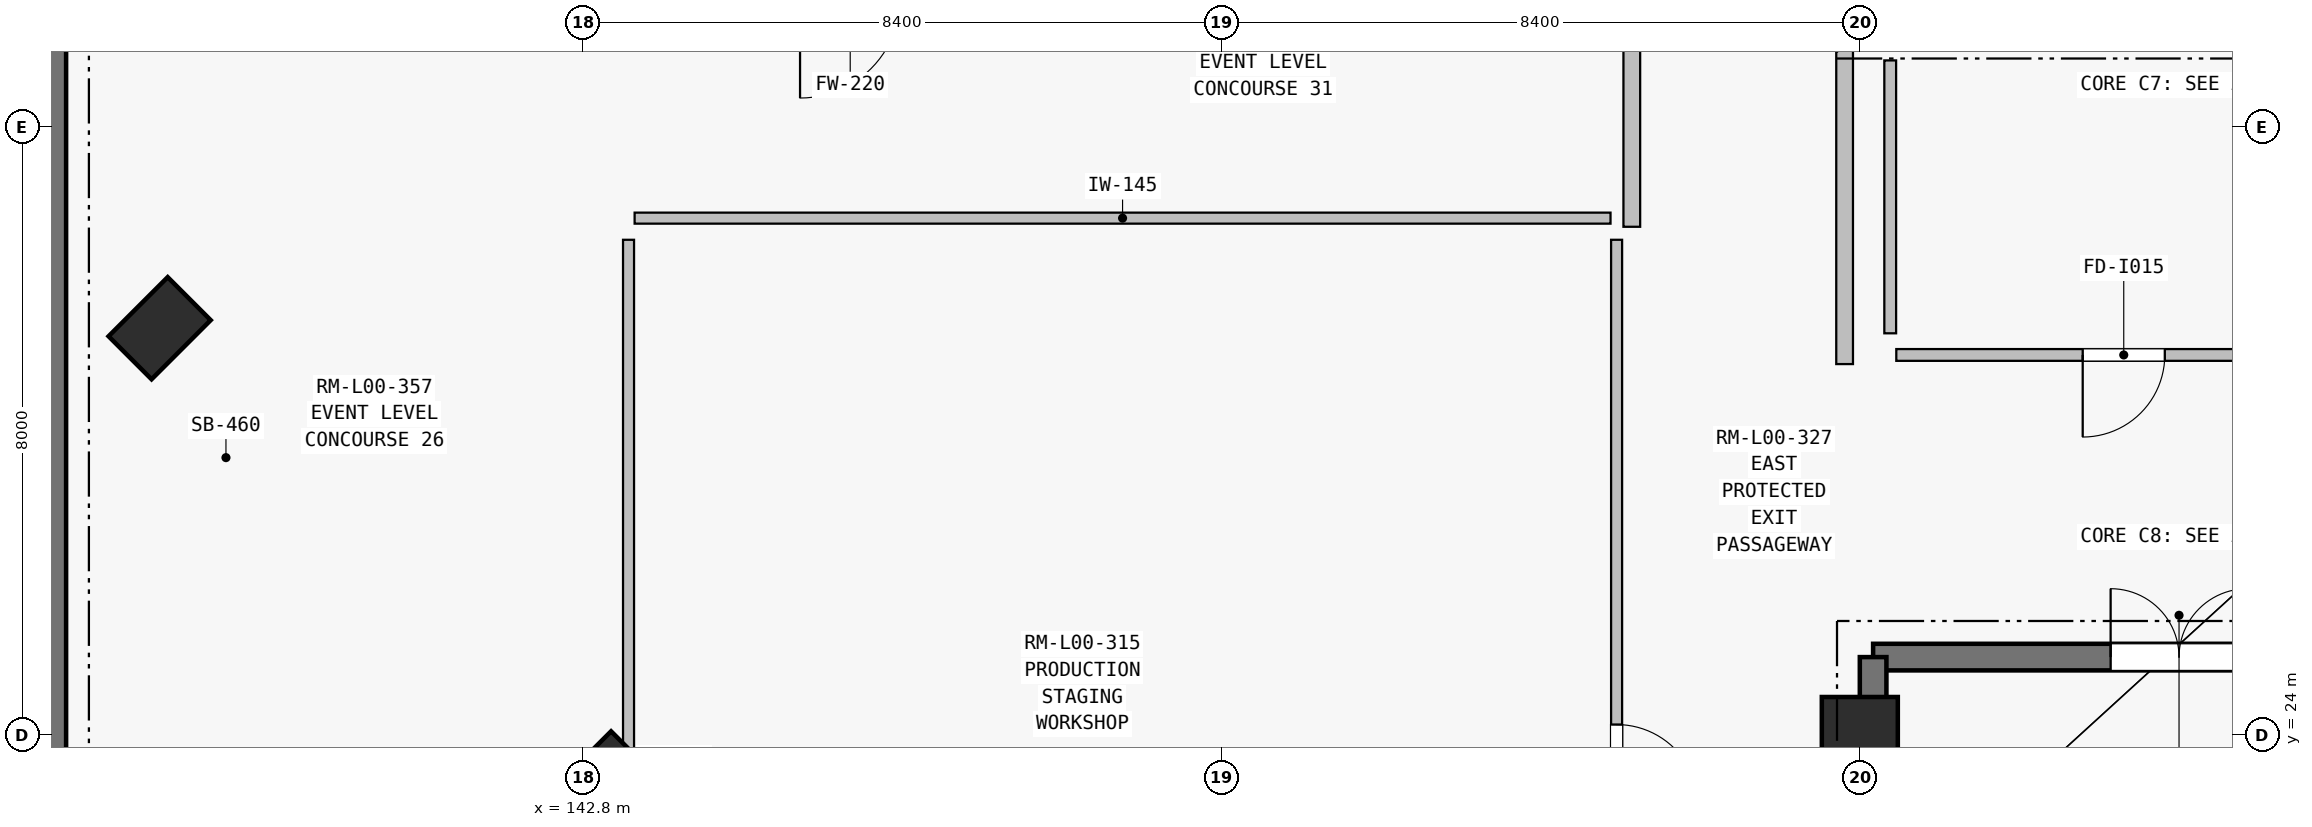
"""IFC4 building model, lengths in metres.
Left out: names, types, materials, properties, quantities, classifications, styles, units other than length and angle.
Written with IfcOpenShell. Run it as: python <this file> out.ifc"""

import sys

from ifc_helpers import new_model, si_unit, direction, frame, frame_2d, origin, origin_2d, place, context, subcontext, project, spatial, rectangle, i_section, extrude, element, fill, save


model = new_model("IFC4")
c1 = context("Model", 3, precision=1e-05, world=origin(), true_north=direction((0.0, 1.0)))
c2 = subcontext(c1, "Body", "Model", "MODEL_VIEW")
j1 = project(units=[si_unit("LENGTHUNIT", "METRE"), si_unit("PLANEANGLEUNIT", "RADIAN")], contexts=[c1])
p1 = place(None, origin())
s1 = spatial("IfcSite", under=j1, at=p1, CompositionType="ELEMENT")
p2 = place(p1, origin())
s2 = spatial("IfcBuilding", under=s1, at=p2, CompositionType="ELEMENT")
p3 = place(p2, origin())
s3 = spatial("IfcBuildingStorey", under=s2, at=p3, CompositionType="ELEMENT", Elevation=0.0)
p4 = place(p3, frame((137.231, 29.352, 0.0), z_axis=(0.0, 0.0, 1.0), x_axis=(0.707106781187, -0.707106781187, 0.0)))
e1 = element("IfcColumn", 1, at=p4, inside=s3, PredefinedType="COLUMN", context=c2, shape_type="SweptSolid", body=[
    extrude(rectangle(XDim=0.8, YDim=1.1, at=origin_2d()), origin(), (0.0, 0.0, 1.0), 5.4),
])
p5 = place(p3, frame((143.17, 23.695, 0.0), z_axis=(0.0, 0.0, 1.0), x_axis=(0.707106781187, -0.707106781187, 0.0)))
e2 = element("IfcColumn", 2, at=p5, inside=s3, PredefinedType="COLUMN", context=c2, shape_type="SweptSolid", body=[
    extrude(i_section(OverallWidth=0.5, OverallDepth=0.5, WebThickness=0.02, FlangeThickness=0.035, at=origin_2d()), origin(), (0.0, 0.0, 1.0), 5.4),
])
p6 = place(p3, frame((159.6, 24.0, 0.0), z_axis=(0.0, 0.0, 1.0), x_axis=(1.0, 0.0, 0.0)))
e3 = element("IfcColumn", 3, at=p6, inside=s3, PredefinedType="COLUMN", context=c2, shape_type="SweptSolid", body=[
    extrude(rectangle(XDim=1.0, YDim=1.0, at=origin_2d()), origin(), (0.0, 0.0, 1.0), 5.4),
])
p7 = place(p3, frame((135.825, 18.775, 0.0), z_axis=(0.0, 0.0, 1.0), x_axis=(0.0, 1.0, 0.0)))
e4 = element("IfcWall", 4, at=p7, inside=s3, PredefinedType="SHEAR", context=c2, shape_type="SweptSolid", body=[
    extrude(rectangle(XDim=14.85, YDim=0.35, at=frame_2d((7.425, 0.0))), origin(), (0.0, 0.0, 1.0), 5.4),
])
p8 = place(p7, frame((2.855, 0.0, 0.0)))
e5 = element("IfcOpeningElement", 5, at=p8, cuts=e4, PredefinedType="OPENING", context=c2, shape_type="SweptSolid", body=[
    extrude(rectangle(XDim=0.9, YDim=2.1, at=frame_2d((0.45, 1.05))), frame((0.0, 0.185, 0.0), z_axis=(0.0, -1.0, 0.0), x_axis=(1.0, 0.0, 0.0)), (0.0, 0.0, 1.0), 0.37),
])
p9 = place(p3, frame((159.775, 25.025, 0.0), z_axis=(0.0, 0.0, 1.0), x_axis=(1.0, 0.0, 0.0)))
e6 = element("IfcWall", 6, at=p9, inside=s3, PredefinedType="SHEAR", context=c2, shape_type="SweptSolid", body=[
    extrude(rectangle(XDim=8.05, YDim=0.35, at=frame_2d((4.025, 0.0))), origin(), (0.0, 0.0, 1.0), 5.4),
])
p10 = place(p9, frame((3.125, 0.0, 0.0)))
e7 = element("IfcOpeningElement", 7, at=p10, cuts=e6, PredefinedType="OPENING", context=c2, shape_type="SweptSolid", body=[
    extrude(rectangle(XDim=1.8, YDim=2.25, at=frame_2d((0.9, 1.125))), frame((0.0, 0.185, 0.0), z_axis=(0.0, -1.0, 0.0), x_axis=(1.0, 0.0, 0.0)), (0.0, 0.0, 1.0), 0.37),
])
p11 = place(p3, frame((159.775, 10.175, 0.0), z_axis=(0.0, 0.0, 1.0), x_axis=(0.0, 1.0, 0.0)))
e8 = element("IfcWall", 8, at=p11, inside=s3, PredefinedType="SHEAR", context=c2, shape_type="SweptSolid", body=[
    extrude(rectangle(XDim=14.85, YDim=0.35, at=frame_2d((7.425, 0.0))), origin(), (0.0, 0.0, 1.0), 5.4),
])
p12 = place(p3, frame((166.065, 29.0, 0.0), z_axis=(0.0, 0.0, 1.0), x_axis=(-1.0, 0.0, 0.0)))
e9 = element("IfcWall", 9, at=p12, inside=s3, PredefinedType="PARTITIONING", context=c2, shape_type="SweptSolid", body=[
    extrude(rectangle(XDim=5.985, YDim=0.155, at=frame_2d((2.993, 0.0))), origin(), (0.0, 0.0, 1.0), 5.12),
])
p13 = place(p12, frame((2.453, 0.0, 0.0)))
e10 = element("IfcOpeningElement", 10, at=p13, cuts=e9, PredefinedType="OPENING", context=c2, shape_type="SweptSolid", body=[
    extrude(rectangle(XDim=1.08, YDim=2.15, at=frame_2d((0.54, 1.075))), frame((0.0, 0.087, 0.0), z_axis=(0.0, -1.0, 0.0), x_axis=(1.0, 0.0, 0.0)), (0.0, 0.0, 1.0), 0.175),
])
p14 = place(p3, frame((160.0, 29.285, 0.0), z_axis=(0.0, 0.0, 1.0), x_axis=(0.0, 1.0, 0.0)))
e11 = element("IfcWall", 11, at=p14, inside=s3, PredefinedType="PARTITIONING", context=c2, shape_type="SweptSolid", body=[
    extrude(rectangle(XDim=3.59, YDim=0.155, at=frame_2d((1.795, 0.0))), origin(), (0.0, 0.0, 1.0), 5.12),
])
p15 = place(p3, frame((143.48, 30.8, 0.0), z_axis=(0.0, 0.0, 1.0), x_axis=(1.0, 0.0, 0.0)))
e12 = element("IfcWall", 12, at=p15, inside=s3, PredefinedType="PARTITIONING", context=c2, shape_type="SweptSolid", body=[
    extrude(rectangle(XDim=12.84, YDim=0.145, at=frame_2d((6.42, 0.0))), origin(), (0.0, 0.0, 1.0), 4.295),
])
p16 = place(p3, frame((156.4, 30.515, 0.0), z_axis=(0.0, 0.0, 1.0), x_axis=(0.0, -1.0, 0.0)))
e13 = element("IfcWall", 13, at=p16, inside=s3, PredefinedType="PARTITIONING", context=c2, shape_type="SweptSolid", body=[
    extrude(rectangle(XDim=13.835, YDim=0.145, at=frame_2d((6.917, 0.0))), origin(), (0.0, 0.0, 1.0), 5.18),
])
p17 = place(p16, frame((6.378, 0.0, 0.0)))
e14 = element("IfcOpeningElement", 14, at=p17, cuts=e13, PredefinedType="OPENING", context=c2, shape_type="SweptSolid", body=[
    extrude(rectangle(XDim=1.08, YDim=2.15, at=frame_2d((0.54, 1.075))), frame((0.0, 0.083, 0.0), z_axis=(0.0, -1.0, 0.0), x_axis=(1.0, 0.0, 0.0)), (0.0, 0.0, 1.0), 0.165),
])
p18 = place(p3, frame((143.4, 16.885, 0.0), z_axis=(0.0, 0.0, 1.0), x_axis=(0.0, 1.0, 0.0)))
e15 = element("IfcWall", 15, at=p18, inside=s3, PredefinedType="PARTITIONING", context=c2, shape_type="SweptSolid", body=[
    extrude(rectangle(XDim=13.63, YDim=0.145, at=frame_2d((6.815, 0.0))), origin(), (0.0, 0.0, 1.0), 4.295),
])
p19 = place(p3, frame((156.6, 30.686, 0.0), z_axis=(0.0, 0.0, 1.0), x_axis=(0.0, 1.0, 0.0)))
e16 = element("IfcWall", 16, at=p19, inside=s3, PredefinedType="SOLIDWALL", context=c2, shape_type="SweptSolid", body=[
    extrude(rectangle(XDim=2.934, YDim=0.22, at=frame_2d((1.467, 0.0))), origin(), (0.0, 0.0, 1.0), 5.12),
])
p20 = place(p3, frame((159.4, 33.107, 0.0), z_axis=(0.0, 0.0, 1.0), x_axis=(0.0, -1.0, 0.0)))
e17 = element("IfcWall", 17, at=p20, inside=s3, PredefinedType="SOLIDWALL", context=c2, shape_type="SweptSolid", body=[
    extrude(rectangle(XDim=4.227, YDim=0.22, at=frame_2d((2.113, 0.0))), origin(), (0.0, 0.0, 1.0), 5.12),
])
p21 = place(p10, origin())
e18 = element("IfcDoor", 18, at=p21, inside=s3, OperationType="DOUBLE_DOOR_SINGLE_SWING", PredefinedType="DOOR", context=c2, shape_type="SweptSolid", body=[
    extrude(rectangle(XDim=1.8, YDim=2.25, at=frame_2d((0.9, 1.125))), frame((0.0, 0.025, 0.0), z_axis=(0.0, -1.0, 0.0), x_axis=(1.0, 0.0, 0.0)), (0.0, 0.0, 1.0), 0.05),
])
fill(e7, e18)
p22 = place(p13, origin())
e19 = element("IfcDoor", 19, at=p22, inside=s3, OperationType="SINGLE_SWING_RIGHT", PredefinedType="DOOR", context=c2, shape_type="SweptSolid", body=[
    extrude(rectangle(XDim=1.08, YDim=2.15, at=frame_2d((0.54, 1.075))), frame((0.0, 0.025, 0.0), z_axis=(0.0, -1.0, 0.0), x_axis=(1.0, 0.0, 0.0)), (0.0, 0.0, 1.0), 0.05),
])
fill(e10, e19)
p23 = place(p17, origin())
e20 = element("IfcDoor", 20, at=p23, inside=s3, OperationType="SINGLE_SWING_RIGHT", PredefinedType="DOOR", context=c2, shape_type="SweptSolid", body=[
    extrude(rectangle(XDim=1.08, YDim=2.15, at=frame_2d((0.54, 1.075))), frame((0.0, 0.025, 0.0), z_axis=(0.0, -1.0, 0.0), x_axis=(1.0, 0.0, 0.0)), (0.0, 0.0, 1.0), 0.05),
])
fill(e14, e20)
save(model, sys.argv[1])
